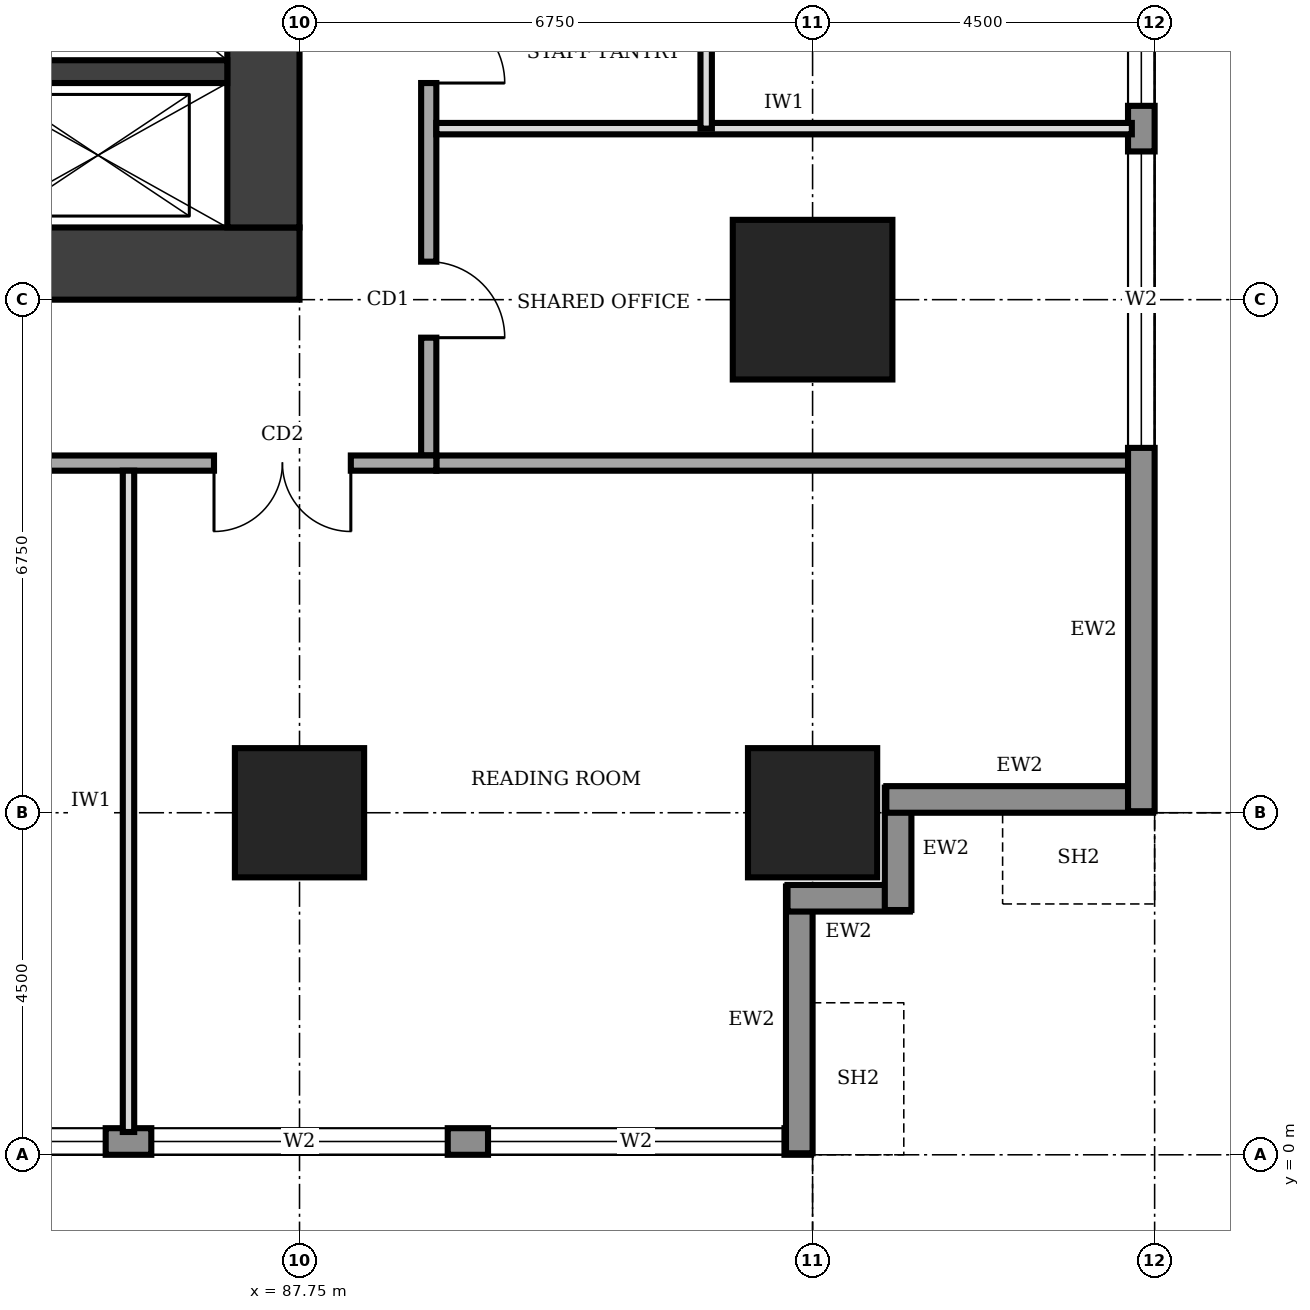
"""IFC4 building model, lengths in metres.
Left out: names, types, materials, properties, quantities, classifications, styles, units other than length and angle.
Written with IfcOpenShell. Run it as: python <this file> out.ifc"""

import sys

from ifc_helpers import new_model, si_unit, direction, frame, frame_2d, origin, origin_2d, place, context, subcontext, project, spatial, rectangle, extrude, element, fill, save


model = new_model("IFC4")
c1 = context("Model", 3, precision=1e-05, world=origin(), true_north=direction((0.0, 1.0)))
c2 = subcontext(c1, "Body", "Model", "MODEL_VIEW")
j1 = project(units=[si_unit("LENGTHUNIT", "METRE"), si_unit("PLANEANGLEUNIT", "RADIAN")], contexts=[c1])
p1 = place(None, origin())
s1 = spatial("IfcSite", under=j1, at=p1, CompositionType="ELEMENT")
p2 = place(p1, origin())
s2 = spatial("IfcBuilding", under=s1, at=p2, CompositionType="ELEMENT")
p3 = place(p2, frame((0.0, 0.0, 53.0)))
s3 = spatial("IfcBuildingStorey", under=s2, at=p3, CompositionType="ELEMENT", Elevation=53.0)
p4 = place(p3, frame((74.25, 11.725, 0.0), z_axis=(0.0, 0.0, 1.0), x_axis=(1.0, 0.0, 0.0)))
e1 = element("IfcWall", 1, at=p4, inside=s3, PredefinedType="SHEAR", context=c2, shape_type="SweptSolid", body=[
    extrude(rectangle(XDim=13.5, YDim=0.95, at=frame_2d((6.75, 0.0))), origin(), (0.0, 0.0, 1.0), 4.0),
])
p5 = place(p4, frame((4.75, 0.0, 0.0)))
e2 = element("IfcOpeningElement", 2, at=p5, cuts=e1, PredefinedType="OPENING", context=c2, shape_type="SweptSolid", body=[
    extrude(rectangle(XDim=1.0, YDim=2.1, at=frame_2d((0.5, 1.05))), frame((0.0, 0.485, 0.0), z_axis=(0.0, -1.0, 0.0), x_axis=(1.0, 0.0, 0.0)), (0.0, 0.0, 1.0), 0.97),
])
p6 = place(p3, frame((87.275, 12.2, 0.0), z_axis=(0.0, 0.0, 1.0), x_axis=(0.0, 1.0, 0.0)))
e3 = element("IfcWall", 3, at=p6, inside=s3, PredefinedType="SHEAR", context=c2, shape_type="SweptSolid", body=[
    extrude(rectangle(XDim=16.1, YDim=0.95, at=frame_2d((8.05, 0.0))), origin(), (0.0, 0.0, 1.0), 4.0),
])
p7 = place(p3, frame((83.4, 14.25, 0.0), z_axis=(0.0, 0.0, 1.0), x_axis=(1.0, 0.0, 0.0)))
e4 = element("IfcWall", 4, at=p7, inside=s3, PredefinedType="SHEAR", context=c2, shape_type="SweptSolid", body=[
    extrude(rectangle(XDim=3.4, YDim=0.3, at=frame_2d((1.7, 0.0))), origin(), (0.0, 0.0, 1.0), 4.0),
])
for number, where, z_axis, x_axis in (
    (5, (87.75, 4.5, 0.0), (0.0, 0.0, 1.0), (1.0, 0.0, 0.0)),
    (6, (94.5, 4.5, 0.0), (0.0, 0.0, 1.0), (1.0, 0.0, 0.0)),
):
    element("IfcColumn", number, at=place(p3, frame(where, z_axis=z_axis, x_axis=x_axis)), inside=s3, PredefinedType="COLUMN", context=c2, shape_type="SweptSolid", body=[
        extrude(rectangle(XDim=1.7, YDim=1.7, at=origin_2d()), origin(), (0.0, 0.0, 1.0), 4.0),
    ])
p8 = place(p3, frame((94.5, 11.25, 0.0), z_axis=(0.0, 0.0, 1.0), x_axis=(1.0, 0.0, 0.0)))
e7 = element("IfcColumn", 7, at=p8, inside=s3, PredefinedType="COLUMN", context=c2, shape_type="SweptSolid", body=[
    extrude(rectangle(XDim=2.1, YDim=2.1, at=origin_2d()), origin(), (0.0, 0.0, 1.0), 4.0),
])
p9 = place(p3, frame((67.52, 0.175, 0.0), z_axis=(0.0, 0.0, 1.0), x_axis=(1.0, 0.0, 0.0)))
e8 = element("IfcWall", 8, at=p9, inside=s3, PredefinedType="STANDARD", context=c2, shape_type="SweptSolid", body=[
    extrude(rectangle(XDim=26.96, YDim=0.35, at=frame_2d((13.48, 0.0))), origin(), (0.0, 0.0, 1.0), 3.75),
])
p10 = place(p9, frame((4.78, 0.0, 0.6)))
e9 = element("IfcOpeningElement", 9, at=p10, cuts=e8, PredefinedType="OPENING", context=c2, shape_type="SweptSolid", body=[
    extrude(rectangle(XDim=3.9, YDim=2.6, at=frame_2d((1.95, 1.3))), frame((0.0, 0.185, 0.0), z_axis=(0.0, -1.0, 0.0), x_axis=(1.0, 0.0, 0.0)), (0.0, 0.0, 1.0), 0.37),
])
p11 = place(p9, frame((9.28, 0.0, 0.6)))
e10 = element("IfcOpeningElement", 10, at=p11, cuts=e8, PredefinedType="OPENING", context=c2, shape_type="SweptSolid", body=[
    extrude(rectangle(XDim=3.9, YDim=2.6, at=frame_2d((1.95, 1.3))), frame((0.0, 0.185, 0.0), z_axis=(0.0, -1.0, 0.0), x_axis=(1.0, 0.0, 0.0)), (0.0, 0.0, 1.0), 0.37),
])
p12 = place(p9, frame((13.78, 0.0, 0.6)))
e11 = element("IfcOpeningElement", 11, at=p12, cuts=e8, PredefinedType="OPENING", context=c2, shape_type="SweptSolid", body=[
    extrude(rectangle(XDim=3.9, YDim=2.6, at=frame_2d((1.95, 1.3))), frame((0.0, 0.185, 0.0), z_axis=(0.0, -1.0, 0.0), x_axis=(1.0, 0.0, 0.0)), (0.0, 0.0, 1.0), 0.37),
])
p13 = place(p9, frame((18.28, 0.0, 0.6)))
e12 = element("IfcOpeningElement", 12, at=p13, cuts=e8, PredefinedType="OPENING", context=c2, shape_type="SweptSolid", body=[
    extrude(rectangle(XDim=3.9, YDim=2.6, at=frame_2d((1.95, 1.3))), frame((0.0, 0.185, 0.0), z_axis=(0.0, -1.0, 0.0), x_axis=(1.0, 0.0, 0.0)), (0.0, 0.0, 1.0), 0.37),
])
p14 = place(p9, frame((22.71, 0.0, 0.6)))
e13 = element("IfcOpeningElement", 13, at=p14, cuts=e8, PredefinedType="OPENING", context=c2, shape_type="SweptSolid", body=[
    extrude(rectangle(XDim=3.9, YDim=2.6, at=frame_2d((1.95, 1.3))), frame((0.0, 0.185, 0.0), z_axis=(0.0, -1.0, 0.0), x_axis=(1.0, 0.0, 0.0)), (0.0, 0.0, 1.0), 0.37),
])
p15 = place(p3, frame((94.325, 0.02, 0.0), z_axis=(0.0, 0.0, 1.0), x_axis=(0.0, 1.0, 0.0)))
e14 = element("IfcWall", 14, at=p15, inside=s3, PredefinedType="STANDARD", context=c2, shape_type="SweptSolid", body=[
    extrude(rectangle(XDim=3.51, YDim=0.35, at=frame_2d((1.755, 0.0))), origin(), (0.0, 0.0, 1.0), 2.85),
])
for number, where, z_axis, x_axis in (
    (15, (94.17, 3.375, 0.0), (0.0, 0.0, 1.0), (1.0, 0.0, 0.0)),
    (16, (95.625, 3.22, 0.0), (0.0, 0.0, 1.0), (0.0, 1.0, 0.0)),
):
    element("IfcWall", number, at=place(p3, frame(where, z_axis=z_axis, x_axis=x_axis)), inside=s3, PredefinedType="STANDARD", context=c2, shape_type="SweptSolid", body=[
        extrude(rectangle(XDim=1.61, YDim=0.35, at=frame_2d((0.805, 0.0))), origin(), (0.0, 0.0, 1.0), 3.75),
    ])
p16 = place(p3, frame((95.47, 4.675, 0.0), z_axis=(0.0, 0.0, 1.0), x_axis=(1.0, 0.0, 0.0)))
e17 = element("IfcWall", 17, at=p16, inside=s3, PredefinedType="STANDARD", context=c2, shape_type="SweptSolid", body=[
    extrude(rectangle(XDim=3.51, YDim=0.35, at=frame_2d((1.755, 0.0))), origin(), (0.0, 0.0, 1.0), 2.85),
])
p17 = place(p3, frame((98.825, 4.52, 0.0), z_axis=(0.0, 0.0, 1.0), x_axis=(0.0, 1.0, 0.0)))
e18 = element("IfcWall", 18, at=p17, inside=s3, PredefinedType="STANDARD", context=c2, shape_type="SweptSolid", body=[
    extrude(rectangle(XDim=31.46, YDim=0.35, at=frame_2d((15.73, 0.0))), origin(), (0.0, 0.0, 1.0), 3.75),
])
p18 = place(p17, frame((4.78, 0.0, 0.6)))
e19 = element("IfcOpeningElement", 19, at=p18, cuts=e18, PredefinedType="OPENING", context=c2, shape_type="SweptSolid", body=[
    extrude(rectangle(XDim=3.9, YDim=2.6, at=frame_2d((1.95, 1.3))), frame((0.0, 0.185, 0.0), z_axis=(0.0, -1.0, 0.0), x_axis=(1.0, 0.0, 0.0)), (0.0, 0.0, 1.0), 0.37),
])
p19 = place(p17, frame((9.28, 0.0, 0.6)))
e20 = element("IfcOpeningElement", 20, at=p19, cuts=e18, PredefinedType="OPENING", context=c2, shape_type="SweptSolid", body=[
    extrude(rectangle(XDim=3.9, YDim=2.6, at=frame_2d((1.95, 1.3))), frame((0.0, 0.185, 0.0), z_axis=(0.0, -1.0, 0.0), x_axis=(1.0, 0.0, 0.0)), (0.0, 0.0, 1.0), 0.37),
])
p20 = place(p17, frame((13.78, 0.0, 0.6)))
e21 = element("IfcOpeningElement", 21, at=p20, cuts=e18, PredefinedType="OPENING", context=c2, shape_type="SweptSolid", body=[
    extrude(rectangle(XDim=3.9, YDim=2.6, at=frame_2d((1.95, 1.3))), frame((0.0, 0.185, 0.0), z_axis=(0.0, -1.0, 0.0), x_axis=(1.0, 0.0, 0.0)), (0.0, 0.0, 1.0), 0.37),
])
p21 = place(p17, frame((18.28, 0.0, 0.6)))
e22 = element("IfcOpeningElement", 22, at=p21, cuts=e18, PredefinedType="OPENING", context=c2, shape_type="SweptSolid", body=[
    extrude(rectangle(XDim=3.9, YDim=2.6, at=frame_2d((1.95, 1.3))), frame((0.0, 0.185, 0.0), z_axis=(0.0, -1.0, 0.0), x_axis=(1.0, 0.0, 0.0)), (0.0, 0.0, 1.0), 0.37),
])
p22 = place(p17, frame((22.78, 0.0, 0.6)))
e23 = element("IfcOpeningElement", 23, at=p22, cuts=e18, PredefinedType="OPENING", context=c2, shape_type="SweptSolid", body=[
    extrude(rectangle(XDim=3.9, YDim=2.6, at=frame_2d((1.95, 1.3))), frame((0.0, 0.185, 0.0), z_axis=(0.0, -1.0, 0.0), x_axis=(1.0, 0.0, 0.0)), (0.0, 0.0, 1.0), 0.37),
])
p23 = place(p17, frame((27.21, 0.0, 0.6)))
e24 = element("IfcOpeningElement", 24, at=p23, cuts=e18, PredefinedType="OPENING", context=c2, shape_type="SweptSolid", body=[
    extrude(rectangle(XDim=3.9, YDim=2.6, at=frame_2d((1.95, 1.3))), frame((0.0, 0.185, 0.0), z_axis=(0.0, -1.0, 0.0), x_axis=(1.0, 0.0, 0.0)), (0.0, 0.0, 1.0), 0.37),
])
p24 = place(p3, frame((71.9, 9.1, 0.0), z_axis=(0.0, 0.0, 1.0), x_axis=(1.0, 0.0, 0.0)))
e25 = element("IfcWall", 25, at=p24, inside=s3, PredefinedType="SOLIDWALL", context=c2, shape_type="SweptSolid", body=[
    extrude(rectangle(XDim=17.65, YDim=0.2, at=frame_2d((8.825, 0.0))), origin(), (0.0, 0.0, 1.0), 3.75),
])
p25 = place(p24, frame((5.8, 0.0, 0.0)))
e26 = element("IfcOpeningElement", 26, at=p25, cuts=e25, PredefinedType="OPENING", context=c2, shape_type="SweptSolid", body=[
    extrude(rectangle(XDim=1.8, YDim=2.1, at=frame_2d((0.9, 1.05))), frame((0.0, 0.11, 0.0), z_axis=(0.0, -1.0, 0.0), x_axis=(1.0, 0.0, 0.0)), (0.0, 0.0, 1.0), 0.22),
])
p26 = place(p24, frame((14.725, 0.0, 0.0)))
e27 = element("IfcOpeningElement", 27, at=p26, cuts=e25, PredefinedType="OPENING", context=c2, shape_type="SweptSolid", body=[
    extrude(rectangle(XDim=1.8, YDim=2.1, at=frame_2d((0.9, 1.05))), frame((0.0, 0.11, 0.0), z_axis=(0.0, -1.0, 0.0), x_axis=(1.0, 0.0, 0.0)), (0.0, 0.0, 1.0), 0.22),
])
p27 = place(p3, frame((89.45, 9.2, 0.0), z_axis=(0.0, 0.0, 1.0), x_axis=(0.0, 1.0, 0.0)))
e28 = element("IfcWall", 28, at=p27, inside=s3, PredefinedType="SOLIDWALL", context=c2, shape_type="SweptSolid", body=[
    extrude(rectangle(XDim=23.05, YDim=0.2, at=frame_2d((11.525, 0.0))), origin(), (0.0, 0.0, 1.0), 3.75),
])
p28 = place(p27, frame((1.55, 0.0, 0.0)))
e29 = element("IfcOpeningElement", 29, at=p28, cuts=e28, PredefinedType="OPENING", context=c2, shape_type="SweptSolid", body=[
    extrude(rectangle(XDim=1.0, YDim=2.1, at=frame_2d((0.5, 1.05))), frame((0.0, 0.11, 0.0), z_axis=(0.0, -1.0, 0.0), x_axis=(1.0, 0.0, 0.0)), (0.0, 0.0, 1.0), 0.22),
])
p29 = place(p27, frame((4.9, 0.0, 0.0)))
e30 = element("IfcOpeningElement", 30, at=p29, cuts=e28, PredefinedType="OPENING", context=c2, shape_type="SweptSolid", body=[
    extrude(rectangle(XDim=1.0, YDim=2.1, at=frame_2d((0.5, 1.05))), frame((0.0, 0.11, 0.0), z_axis=(0.0, -1.0, 0.0), x_axis=(1.0, 0.0, 0.0)), (0.0, 0.0, 1.0), 0.22),
])
p30 = place(p27, frame((8.0, 0.0, 0.0)))
e31 = element("IfcOpeningElement", 31, at=p30, cuts=e28, PredefinedType="OPENING", context=c2, shape_type="SweptSolid", body=[
    extrude(rectangle(XDim=0.9, YDim=2.1, at=frame_2d((0.45, 1.05))), frame((0.0, 0.11, 0.0), z_axis=(0.0, -1.0, 0.0), x_axis=(1.0, 0.0, 0.0)), (0.0, 0.0, 1.0), 0.22),
])
p31 = place(p27, frame((11.05, 0.0, 0.0)))
e32 = element("IfcOpeningElement", 32, at=p31, cuts=e28, PredefinedType="OPENING", context=c2, shape_type="SweptSolid", body=[
    extrude(rectangle(XDim=0.9, YDim=2.1, at=frame_2d((0.45, 1.05))), frame((0.0, 0.11, 0.0), z_axis=(0.0, -1.0, 0.0), x_axis=(1.0, 0.0, 0.0)), (0.0, 0.0, 1.0), 0.22),
])
p32 = place(p27, frame((15.75, 0.0, 0.0)))
e33 = element("IfcOpeningElement", 33, at=p32, cuts=e28, PredefinedType="OPENING", context=c2, shape_type="SweptSolid", body=[
    extrude(rectangle(XDim=0.9, YDim=2.1, at=frame_2d((0.45, 1.05))), frame((0.0, 0.11, 0.0), z_axis=(0.0, -1.0, 0.0), x_axis=(1.0, 0.0, 0.0)), (0.0, 0.0, 1.0), 0.22),
])
p33 = place(p27, frame((13.1, 0.0, 0.0)))
e34 = element("IfcOpeningElement", 34, at=p33, cuts=e28, PredefinedType="OPENING", context=c2, shape_type="SweptSolid", body=[
    extrude(rectangle(XDim=1.0, YDim=2.1, at=frame_2d((0.5, 1.05))), frame((0.0, 0.11, 0.0), z_axis=(0.0, -1.0, 0.0), x_axis=(1.0, 0.0, 0.0)), (0.0, 0.0, 1.0), 0.22),
])
p34 = place(p27, frame((19.925, 0.0, 0.0)))
e35 = element("IfcOpeningElement", 35, at=p34, cuts=e28, PredefinedType="OPENING", context=c2, shape_type="SweptSolid", body=[
    extrude(rectangle(XDim=1.0, YDim=2.1, at=frame_2d((0.5, 1.05))), frame((0.0, 0.11, 0.0), z_axis=(0.0, -1.0, 0.0), x_axis=(1.0, 0.0, 0.0)), (0.0, 0.0, 1.0), 0.22),
])
p35 = place(p3, frame((89.55, 9.1, 0.0), z_axis=(0.0, 0.0, 1.0), x_axis=(1.0, 0.0, 0.0)))
e36 = element("IfcWall", 36, at=p35, inside=s3, PredefinedType="SOLIDWALL", context=c2, shape_type="SweptSolid", body=[
    extrude(rectangle(XDim=9.15, YDim=0.2, at=frame_2d((4.575, 0.0))), origin(), (0.0, 0.0, 1.0), 3.75),
])
p36 = place(p3, frame((85.5, 0.3, 0.0), z_axis=(0.0, 0.0, 1.0), x_axis=(0.0, 1.0, 0.0)))
e37 = element("IfcWall", 37, at=p36, inside=s3, PredefinedType="PARTITIONING", context=c2, shape_type="SweptSolid", body=[
    extrude(rectangle(XDim=8.7, YDim=0.15, at=frame_2d((4.35, 0.0))), origin(), (0.0, 0.0, 1.0), 3.75),
])
p37 = place(p3, frame((89.55, 13.5, 0.0), z_axis=(0.0, 0.0, 1.0), x_axis=(1.0, 0.0, 0.0)))
e38 = element("IfcWall", 38, at=p37, inside=s3, PredefinedType="PARTITIONING", context=c2, shape_type="SweptSolid", body=[
    extrude(rectangle(XDim=9.15, YDim=0.15, at=frame_2d((4.575, 0.0))), origin(), (0.0, 0.0, 1.0), 3.75),
])
p38 = place(p3, frame((93.1, 13.5, 0.0), z_axis=(0.0, 0.0, 1.0), x_axis=(0.0, 1.0, 0.0)))
e39 = element("IfcWall", 39, at=p38, inside=s3, PredefinedType="PARTITIONING", context=c2, shape_type="SweptSolid", body=[
    extrude(rectangle(XDim=2.2, YDim=0.15, at=frame_2d((1.1, 0.0))), origin(), (0.0, 0.0, 1.0), 3.75),
])
p39 = place(p12, origin())
e40 = element("IfcWindow", 40, at=p39, inside=s3, PartitioningType="SINGLE_PANEL", PredefinedType="WINDOW", context=c2, shape_type="SweptSolid", body=[
    extrude(rectangle(XDim=3.9, YDim=2.6, at=frame_2d((1.95, 1.3))), frame((0.0, 0.03, 0.0), z_axis=(0.0, -1.0, 0.0), x_axis=(1.0, 0.0, 0.0)), (0.0, 0.0, 1.0), 0.06),
])
fill(e11, e40)
p40 = place(p13, origin())
e41 = element("IfcWindow", 41, at=p40, inside=s3, PartitioningType="SINGLE_PANEL", PredefinedType="WINDOW", context=c2, shape_type="SweptSolid", body=[
    extrude(rectangle(XDim=3.9, YDim=2.6, at=frame_2d((1.95, 1.3))), frame((0.0, 0.03, 0.0), z_axis=(0.0, -1.0, 0.0), x_axis=(1.0, 0.0, 0.0)), (0.0, 0.0, 1.0), 0.06),
])
fill(e12, e41)
p41 = place(p14, origin())
e42 = element("IfcWindow", 42, at=p41, inside=s3, PartitioningType="SINGLE_PANEL", PredefinedType="WINDOW", context=c2, shape_type="SweptSolid", body=[
    extrude(rectangle(XDim=3.9, YDim=2.6, at=frame_2d((1.95, 1.3))), frame((0.0, 0.03, 0.0), z_axis=(0.0, -1.0, 0.0), x_axis=(1.0, 0.0, 0.0)), (0.0, 0.0, 1.0), 0.06),
])
fill(e13, e42)
p42 = place(p18, origin())
e43 = element("IfcWindow", 43, at=p42, inside=s3, PartitioningType="SINGLE_PANEL", PredefinedType="WINDOW", context=c2, shape_type="SweptSolid", body=[
    extrude(rectangle(XDim=3.9, YDim=2.6, at=frame_2d((1.95, 1.3))), frame((0.0, 0.03, 0.0), z_axis=(0.0, -1.0, 0.0), x_axis=(1.0, 0.0, 0.0)), (0.0, 0.0, 1.0), 0.06),
])
fill(e19, e43)
p43 = place(p19, origin())
e44 = element("IfcWindow", 44, at=p43, inside=s3, PartitioningType="SINGLE_PANEL", PredefinedType="WINDOW", context=c2, shape_type="SweptSolid", body=[
    extrude(rectangle(XDim=3.9, YDim=2.6, at=frame_2d((1.95, 1.3))), frame((0.0, 0.03, 0.0), z_axis=(0.0, -1.0, 0.0), x_axis=(1.0, 0.0, 0.0)), (0.0, 0.0, 1.0), 0.06),
])
fill(e20, e44)
p44 = place(p26, frame((1.8, 0.0, 0.0), z_axis=(0.0, 0.0, 1.0), x_axis=(-1.0, 0.0, 0.0)))
e45 = element("IfcDoor", 45, at=p44, inside=s3, OperationType="DOUBLE_DOOR_SINGLE_SWING", PredefinedType="DOOR", context=c2, shape_type="SweptSolid", body=[
    extrude(rectangle(XDim=1.8, YDim=2.1, at=frame_2d((0.9, 1.05))), frame((0.0, 0.025, 0.0), z_axis=(0.0, -1.0, 0.0), x_axis=(1.0, 0.0, 0.0)), (0.0, 0.0, 1.0), 0.05),
])
fill(e27, e45)
p45 = place(p28, frame((1.0, 0.0, 0.0), z_axis=(0.0, 0.0, 1.0), x_axis=(-1.0, 0.0, 0.0)))
e46 = element("IfcDoor", 46, at=p45, inside=s3, OperationType="SINGLE_SWING_RIGHT", PredefinedType="DOOR", context=c2, shape_type="SweptSolid", body=[
    extrude(rectangle(XDim=1.0, YDim=2.1, at=frame_2d((0.5, 1.05))), frame((0.0, 0.025, 0.0), z_axis=(0.0, -1.0, 0.0), x_axis=(1.0, 0.0, 0.0)), (0.0, 0.0, 1.0), 0.05),
])
fill(e29, e46)
p46 = place(p29, frame((1.0, 0.0, 0.0), z_axis=(0.0, 0.0, 1.0), x_axis=(-1.0, 0.0, 0.0)))
e47 = element("IfcDoor", 47, at=p46, inside=s3, OperationType="SINGLE_SWING_RIGHT", PredefinedType="DOOR", context=c2, shape_type="SweptSolid", body=[
    extrude(rectangle(XDim=1.0, YDim=2.1, at=frame_2d((0.5, 1.05))), frame((0.0, 0.025, 0.0), z_axis=(0.0, -1.0, 0.0), x_axis=(1.0, 0.0, 0.0)), (0.0, 0.0, 1.0), 0.05),
])
fill(e30, e47)
save(model, sys.argv[1])
